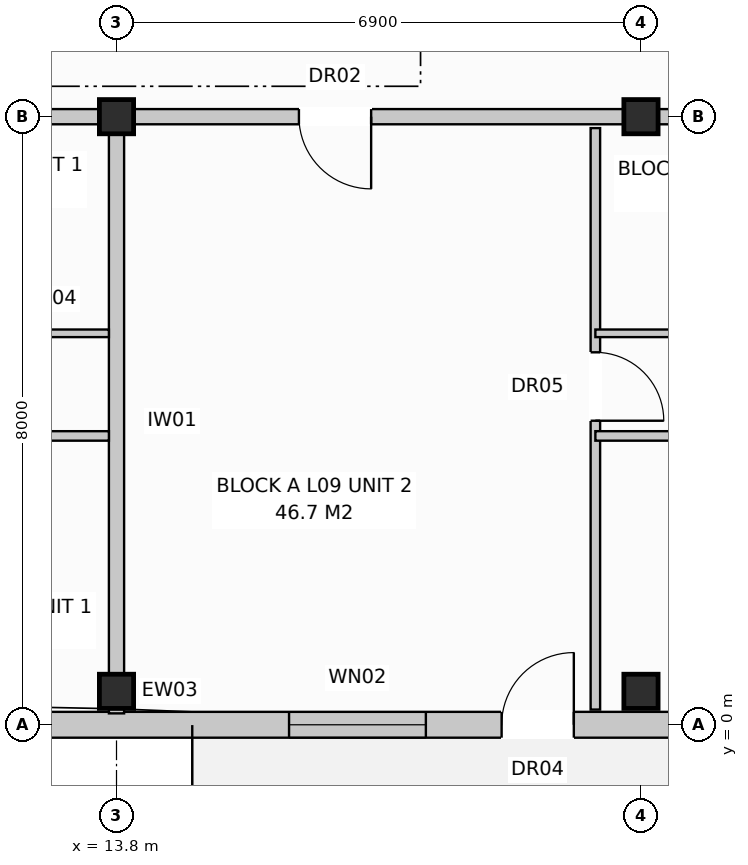
"""IFC4 building model, lengths in metres.
Left out: names, types, materials, properties, quantities, classifications, styles, units other than length and angle.
Written with IfcOpenShell. Run it as: python <this file> out.ifc"""

import sys

from ifc_helpers import new_model, si_unit, direction, frame, frame_2d, origin, origin_with_axes, origin_2d, place, context, subcontext, project, spatial, rectangle, extrude, element, fill, save


model = new_model("IFC4")
c1 = context("Model", 3, precision=1e-05, world=origin(), true_north=direction((0.0, 1.0)))
c2 = subcontext(c1, "Body", "Model", "MODEL_VIEW")
j1 = project(units=[si_unit("LENGTHUNIT", "METRE"), si_unit("PLANEANGLEUNIT", "RADIAN")], contexts=[c1])
p1 = place(None, origin())
s1 = spatial("IfcSite", under=j1, at=p1, CompositionType="ELEMENT")
p2 = place(p1, origin())
s2 = spatial("IfcBuilding", under=s1, at=p2, CompositionType="ELEMENT")
p3 = place(p2, frame((0.0, 0.0, 30.4)))
s3 = spatial("IfcBuildingStorey", under=s2, at=p3, CompositionType="ELEMENT", Elevation=30.4)
for number, where, z_axis, x_axis in (
    (1, (13.8, 0.44, 0.0), (0.0, 0.0, 1.0), (1.0, 0.0, 0.0)),
    (2, (13.8, 8.0, 0.0), (0.0, 0.0, 1.0), (1.0, 0.0, 0.0)),
    (3, (20.7, 0.44, 0.0), (0.0, 0.0, 1.0), (1.0, 0.0, 0.0)),
    (4, (20.7, 8.0, 0.0), (0.0, 0.0, 1.0), (1.0, 0.0, 0.0)),
):
    element("IfcColumn", number, at=place(p3, frame(where, z_axis=z_axis, x_axis=x_axis)), inside=s3, PredefinedType="COLUMN", context=c2, shape_type="SweptSolid", body=[
        extrude(rectangle(XDim=0.45, YDim=0.45, at=origin_2d()), origin(), (0.0, 0.0, 1.0), 3.2),
    ])
p4 = place(p3, frame((0.16, 0.0, 0.0), z_axis=(0.0, 0.0, 1.0), x_axis=(1.0, 0.0, 0.0)))
e5 = element("IfcWall", 5, at=p4, inside=s3, PredefinedType="STANDARD", context=c2, shape_type="SweptSolid", body=[
    extrude(rectangle(XDim=41.08, YDim=0.34, at=frame_2d((20.54, 0.0))), origin(), (0.0, 0.0, 1.0), 2.96),
])
p5 = place(p4, frame((3.807, 0.0, 0.0)))
e6 = element("IfcOpeningElement", 6, at=p5, cuts=e5, PredefinedType="OPENING", context=c2, shape_type="SweptSolid", body=[
    extrude(rectangle(XDim=0.95, YDim=2.1, at=frame_2d((0.475, 1.05))), frame((0.0, 0.182, 0.0), z_axis=(0.0, -1.0, 0.0), x_axis=(1.0, 0.0, 0.0)), (0.0, 0.0, 1.0), 0.364),
])
p6 = place(p4, frame((18.707, 0.0, 0.0)))
e7 = element("IfcOpeningElement", 7, at=p6, cuts=e5, PredefinedType="OPENING", context=c2, shape_type="SweptSolid", body=[
    extrude(rectangle(XDim=0.95, YDim=2.1, at=frame_2d((0.475, 1.05))), frame((0.0, 0.182, 0.0), z_axis=(0.0, -1.0, 0.0), x_axis=(1.0, 0.0, 0.0)), (0.0, 0.0, 1.0), 0.364),
])
p7 = place(p4, frame((29.107, 0.0, 0.0)))
e8 = element("IfcOpeningElement", 8, at=p7, cuts=e5, PredefinedType="OPENING", context=c2, shape_type="SweptSolid", body=[
    extrude(rectangle(XDim=0.95, YDim=2.1, at=frame_2d((0.475, 1.05))), frame((0.0, 0.182, 0.0), z_axis=(0.0, -1.0, 0.0), x_axis=(1.0, 0.0, 0.0)), (0.0, 0.0, 1.0), 0.364),
])
p8 = place(p4, frame((1.61, 0.0, 0.8)))
e9 = element("IfcOpeningElement", 9, at=p8, cuts=e5, PredefinedType="OPENING", context=c2, shape_type="SweptSolid", body=[
    extrude(rectangle(XDim=1.8, YDim=1.7, at=frame_2d((0.9, 0.85))), frame((0.0, 0.182, 0.0), z_axis=(0.0, -1.0, 0.0), x_axis=(1.0, 0.0, 0.0)), (0.0, 0.0, 1.0), 0.364),
])
p9 = place(p4, frame((7.242, 0.0, 0.72)))
e10 = element("IfcOpeningElement", 10, at=p9, cuts=e5, PredefinedType="OPENING", context=c2, shape_type="SweptSolid", body=[
    extrude(rectangle(XDim=1.9, YDim=1.85, at=frame_2d((0.95, 0.925))), frame((0.0, 0.182, 0.0), z_axis=(0.0, -1.0, 0.0), x_axis=(1.0, 0.0, 0.0)), (0.0, 0.0, 1.0), 0.364),
])
p10 = place(p4, frame((10.86, 0.0, 0.72)))
e11 = element("IfcOpeningElement", 11, at=p10, cuts=e5, PredefinedType="OPENING", context=c2, shape_type="SweptSolid", body=[
    extrude(rectangle(XDim=1.1, YDim=1.5, at=frame_2d((0.55, 0.75))), frame((0.0, 0.182, 0.0), z_axis=(0.0, -1.0, 0.0), x_axis=(1.0, 0.0, 0.0)), (0.0, 0.0, 1.0), 0.364),
])
p11 = place(p4, frame((15.91, 0.0, 0.8)))
e12 = element("IfcOpeningElement", 12, at=p11, cuts=e5, PredefinedType="OPENING", context=c2, shape_type="SweptSolid", body=[
    extrude(rectangle(XDim=1.8, YDim=1.7, at=frame_2d((0.9, 0.85))), frame((0.0, 0.182, 0.0), z_axis=(0.0, -1.0, 0.0), x_axis=(1.0, 0.0, 0.0)), (0.0, 0.0, 1.0), 0.364),
])
p12 = place(p4, frame((21.56, 0.0, 0.72)))
e13 = element("IfcOpeningElement", 13, at=p12, cuts=e5, PredefinedType="OPENING", context=c2, shape_type="SweptSolid", body=[
    extrude(rectangle(XDim=1.9, YDim=1.85, at=frame_2d((0.95, 0.925))), frame((0.0, 0.182, 0.0), z_axis=(0.0, -1.0, 0.0), x_axis=(1.0, 0.0, 0.0)), (0.0, 0.0, 1.0), 0.364),
])
p13 = place(p4, frame((25.61, 0.0, 0.72)))
e14 = element("IfcOpeningElement", 14, at=p13, cuts=e5, PredefinedType="OPENING", context=c2, shape_type="SweptSolid", body=[
    extrude(rectangle(XDim=1.1, YDim=1.5, at=frame_2d((0.55, 0.75))), frame((0.0, 0.182, 0.0), z_axis=(0.0, -1.0, 0.0), x_axis=(1.0, 0.0, 0.0)), (0.0, 0.0, 1.0), 0.364),
])
p14 = place(p4, frame((31.41, 0.0, 0.8)))
e15 = element("IfcOpeningElement", 15, at=p14, cuts=e5, PredefinedType="OPENING", context=c2, shape_type="SweptSolid", body=[
    extrude(rectangle(XDim=1.8, YDim=1.7, at=frame_2d((0.9, 0.85))), frame((0.0, 0.182, 0.0), z_axis=(0.0, -1.0, 0.0), x_axis=(1.0, 0.0, 0.0)), (0.0, 0.0, 1.0), 0.364),
])
p15 = place(p4, frame((35.36, 0.0, 0.72)))
e16 = element("IfcOpeningElement", 16, at=p15, cuts=e5, PredefinedType="OPENING", context=c2, shape_type="SweptSolid", body=[
    extrude(rectangle(XDim=1.9, YDim=1.85, at=frame_2d((0.95, 0.925))), frame((0.0, 0.182, 0.0), z_axis=(0.0, -1.0, 0.0), x_axis=(1.0, 0.0, 0.0)), (0.0, 0.0, 1.0), 0.364),
])
p16 = place(p4, frame((39.16, 0.0, 0.72)))
e17 = element("IfcOpeningElement", 17, at=p16, cuts=e5, PredefinedType="OPENING", context=c2, shape_type="SweptSolid", body=[
    extrude(rectangle(XDim=1.1, YDim=1.5, at=frame_2d((0.55, 0.75))), frame((0.0, 0.182, 0.0), z_axis=(0.0, -1.0, 0.0), x_axis=(1.0, 0.0, 0.0)), (0.0, 0.0, 1.0), 0.364),
])
p17 = place(p3, frame((13.8, 7.85, 0.0), z_axis=(0.0, 0.0, 1.0), x_axis=(0.0, -1.0, 0.0)))
e18 = element("IfcWall", 18, at=p17, inside=s3, PredefinedType="PARTITIONING", context=c2, shape_type="SweptSolid", body=[
    extrude(rectangle(XDim=7.7, YDim=0.2, at=frame_2d((3.85, 0.0))), origin(), (0.0, 0.0, 1.0), 2.96),
])
p18 = place(p3, frame((0.0, 8.0, 0.0), z_axis=(0.0, 0.0, 1.0), x_axis=(1.0, 0.0, 0.0)))
e19 = element("IfcWall", 19, at=p18, inside=s3, PredefinedType="PARTITIONING", context=c2, shape_type="SweptSolid", body=[
    extrude(rectangle(XDim=13.8, YDim=0.2, at=frame_2d((6.9, 0.0))), origin(), (0.0, 0.0, 1.0), 2.4),
])
p19 = place(p18, frame((2.4, 0.0, 0.0)))
e20 = element("IfcOpeningElement", 20, at=p19, cuts=e19, PredefinedType="OPENING", context=c2, shape_type="SweptSolid", body=[
    extrude(rectangle(XDim=0.95, YDim=2.15, at=frame_2d((0.475, 1.075))), frame((0.0, 0.112, 0.0), z_axis=(0.0, -1.0, 0.0), x_axis=(1.0, 0.0, 0.0)), (0.0, 0.0, 1.0), 0.224),
])
p20 = place(p3, frame((5.2, 5.15, 0.0), z_axis=(0.0, 0.0, 1.0), x_axis=(1.0, 0.0, 0.0)))
e21 = element("IfcWall", 21, at=p20, inside=s3, PredefinedType="PARTITIONING", context=c2, shape_type="SweptSolid", body=[
    extrude(rectangle(XDim=8.5, YDim=0.1, at=frame_2d((4.25, 0.0))), origin(), (0.0, 0.0, 1.0), 2.96),
])
p21 = place(p20, frame((1.0, 0.0, 0.0)))
e22 = element("IfcOpeningElement", 22, at=p21, cuts=e21, PredefinedType="OPENING", context=c2, shape_type="SweptSolid", body=[
    extrude(rectangle(XDim=0.85, YDim=2.1, at=frame_2d((0.425, 1.05))), frame((0.0, 0.062, 0.0), z_axis=(0.0, -1.0, 0.0), x_axis=(1.0, 0.0, 0.0)), (0.0, 0.0, 1.0), 0.124),
])
p22 = place(p20, frame((3.4, 0.0, 0.0)))
e23 = element("IfcOpeningElement", 23, at=p22, cuts=e21, PredefinedType="OPENING", context=c2, shape_type="SweptSolid", body=[
    extrude(rectangle(XDim=0.85, YDim=2.05, at=frame_2d((0.425, 1.025))), frame((0.0, 0.062, 0.0), z_axis=(0.0, -1.0, 0.0), x_axis=(1.0, 0.0, 0.0)), (0.0, 0.0, 1.0), 0.124),
])
p23 = place(p20, frame((6.2, 0.0, 0.0)))
e24 = element("IfcOpeningElement", 24, at=p23, cuts=e21, PredefinedType="OPENING", context=c2, shape_type="SweptSolid", body=[
    extrude(rectangle(XDim=0.85, YDim=2.05, at=frame_2d((0.425, 1.025))), frame((0.0, 0.062, 0.0), z_axis=(0.0, -1.0, 0.0), x_axis=(1.0, 0.0, 0.0)), (0.0, 0.0, 1.0), 0.124),
])
p24 = place(p3, frame((5.2, 3.8, 0.0), z_axis=(0.0, 0.0, 1.0), x_axis=(1.0, 0.0, 0.0)))
e25 = element("IfcWall", 25, at=p24, inside=s3, PredefinedType="PARTITIONING", context=c2, shape_type="SweptSolid", body=[
    extrude(rectangle(XDim=8.5, YDim=0.125, at=frame_2d((4.25, 0.0))), origin(), (0.0, 0.0, 1.0), 2.96),
])
p25 = place(p24, frame((1.5, 0.0, 0.0)))
e26 = element("IfcOpeningElement", 26, at=p25, cuts=e25, PredefinedType="OPENING", context=c2, shape_type="SweptSolid", body=[
    extrude(rectangle(XDim=0.9, YDim=2.1, at=frame_2d((0.45, 1.05))), frame((0.0, 0.074, 0.0), z_axis=(0.0, -1.0, 0.0), x_axis=(1.0, 0.0, 0.0)), (0.0, 0.0, 1.0), 0.149),
])
p26 = place(p24, frame((5.6, 0.0, 0.0)))
e27 = element("IfcOpeningElement", 27, at=p26, cuts=e25, PredefinedType="OPENING", context=c2, shape_type="SweptSolid", body=[
    extrude(rectangle(XDim=0.9, YDim=2.1, at=frame_2d((0.45, 1.05))), frame((0.0, 0.074, 0.0), z_axis=(0.0, -1.0, 0.0), x_axis=(1.0, 0.0, 0.0)), (0.0, 0.0, 1.0), 0.149),
])
p27 = place(p3, frame((13.8, 8.0, 0.0), z_axis=(0.0, 0.0, 1.0), x_axis=(1.0, 0.0, 0.0)))
e28 = element("IfcWall", 28, at=p27, inside=s3, PredefinedType="PARTITIONING", context=c2, shape_type="SweptSolid", body=[
    extrude(rectangle(XDim=20.7, YDim=0.2, at=frame_2d((10.35, 0.0))), origin(), (0.0, 0.0, 1.0), 2.4),
])
p28 = place(p27, frame((2.4, 0.0, 0.0)))
e29 = element("IfcOpeningElement", 29, at=p28, cuts=e28, PredefinedType="OPENING", context=c2, shape_type="SweptSolid", body=[
    extrude(rectangle(XDim=0.95, YDim=2.15, at=frame_2d((0.475, 1.075))), frame((0.0, 0.112, 0.0), z_axis=(0.0, -1.0, 0.0), x_axis=(1.0, 0.0, 0.0)), (0.0, 0.0, 1.0), 0.224),
])
p29 = place(p3, frame((20.1, 7.85, 0.0), z_axis=(0.0, 0.0, 1.0), x_axis=(0.0, -1.0, 0.0)))
e30 = element("IfcWall", 30, at=p29, inside=s3, PredefinedType="PARTITIONING", context=c2, shape_type="SweptSolid", body=[
    extrude(rectangle(XDim=7.65, YDim=0.125, at=frame_2d((3.825, 0.0))), origin(), (0.0, 0.0, 1.0), 2.96),
])
p30 = place(p29, frame((2.95, 0.0, 0.0)))
e31 = element("IfcOpeningElement", 31, at=p30, cuts=e30, PredefinedType="OPENING", context=c2, shape_type="SweptSolid", body=[
    extrude(rectangle(XDim=0.9, YDim=2.1, at=frame_2d((0.45, 1.05))), frame((0.0, 0.074, 0.0), z_axis=(0.0, -1.0, 0.0), x_axis=(1.0, 0.0, 0.0)), (0.0, 0.0, 1.0), 0.149),
])
p31 = place(p3, frame((20.1, 5.15, 0.0), z_axis=(0.0, 0.0, 1.0), x_axis=(1.0, 0.0, 0.0)))
e32 = element("IfcWall", 32, at=p31, inside=s3, PredefinedType="PARTITIONING", context=c2, shape_type="SweptSolid", body=[
    extrude(rectangle(XDim=14.3, YDim=0.1, at=frame_2d((7.15, 0.0))), origin(), (0.0, 0.0, 1.0), 2.96),
])
p32 = place(p31, frame((1.6, 0.0, 0.0)))
e33 = element("IfcOpeningElement", 33, at=p32, cuts=e32, PredefinedType="OPENING", context=c2, shape_type="SweptSolid", body=[
    extrude(rectangle(XDim=0.9, YDim=2.1, at=frame_2d((0.45, 1.05))), frame((0.0, 0.062, 0.0), z_axis=(0.0, -1.0, 0.0), x_axis=(1.0, 0.0, 0.0)), (0.0, 0.0, 1.0), 0.124),
])
p33 = place(p31, frame((5.1, 0.0, 0.0)))
e34 = element("IfcOpeningElement", 34, at=p33, cuts=e32, PredefinedType="OPENING", context=c2, shape_type="SweptSolid", body=[
    extrude(rectangle(XDim=0.85, YDim=2.05, at=frame_2d((0.425, 1.025))), frame((0.0, 0.062, 0.0), z_axis=(0.0, -1.0, 0.0), x_axis=(1.0, 0.0, 0.0)), (0.0, 0.0, 1.0), 0.124),
])
p34 = place(p31, frame((8.2, 0.0, 0.0)))
e35 = element("IfcOpeningElement", 35, at=p34, cuts=e32, PredefinedType="OPENING", context=c2, shape_type="SweptSolid", body=[
    extrude(rectangle(XDim=0.85, YDim=2.05, at=frame_2d((0.425, 1.025))), frame((0.0, 0.062, 0.0), z_axis=(0.0, -1.0, 0.0), x_axis=(1.0, 0.0, 0.0)), (0.0, 0.0, 1.0), 0.124),
])
p35 = place(p31, frame((11.6, 0.0, 0.0)))
e36 = element("IfcOpeningElement", 36, at=p35, cuts=e32, PredefinedType="OPENING", context=c2, shape_type="SweptSolid", body=[
    extrude(rectangle(XDim=0.85, YDim=2.05, at=frame_2d((0.425, 1.025))), frame((0.0, 0.062, 0.0), z_axis=(0.0, -1.0, 0.0), x_axis=(1.0, 0.0, 0.0)), (0.0, 0.0, 1.0), 0.124),
])
p36 = place(p3, frame((20.1, 3.8, 0.0), z_axis=(0.0, 0.0, 1.0), x_axis=(1.0, 0.0, 0.0)))
e37 = element("IfcWall", 37, at=p36, inside=s3, PredefinedType="PARTITIONING", context=c2, shape_type="SweptSolid", body=[
    extrude(rectangle(XDim=10.4, YDim=0.125, at=frame_2d((5.2, 0.0))), origin(), (0.0, 0.0, 1.0), 2.96),
])
p37 = place(p36, frame((2.0, 0.0, 0.0)))
e38 = element("IfcOpeningElement", 38, at=p37, cuts=e37, PredefinedType="OPENING", context=c2, shape_type="SweptSolid", body=[
    extrude(rectangle(XDim=0.9, YDim=2.1, at=frame_2d((0.45, 1.05))), frame((0.0, 0.074, 0.0), z_axis=(0.0, -1.0, 0.0), x_axis=(1.0, 0.0, 0.0)), (0.0, 0.0, 1.0), 0.149),
])
p38 = place(p36, frame((7.2, 0.0, 0.0)))
e39 = element("IfcOpeningElement", 39, at=p38, cuts=e37, PredefinedType="OPENING", context=c2, shape_type="SweptSolid", body=[
    extrude(rectangle(XDim=0.9, YDim=2.1, at=frame_2d((0.45, 1.05))), frame((0.0, 0.074, 0.0), z_axis=(0.0, -1.0, 0.0), x_axis=(1.0, 0.0, 0.0)), (0.0, 0.0, 1.0), 0.149),
])
p39 = place(p6, origin_with_axes())
e40 = element("IfcDoor", 40, at=p39, inside=s3, OperationType="SINGLE_SWING_RIGHT", PredefinedType="DOOR", context=c2, shape_type="SweptSolid", body=[
    extrude(rectangle(XDim=0.95, YDim=2.1, at=frame_2d((0.475, 1.05))), frame((0.0, 0.025, 0.0), z_axis=(0.0, -1.0, 0.0), x_axis=(1.0, 0.0, 0.0)), (0.0, 0.0, 1.0), 0.05),
])
fill(e7, e40)
p40 = place(p11, origin_with_axes())
e41 = element("IfcWindow", 41, at=p40, inside=s3, PartitioningType="SINGLE_PANEL", PredefinedType="WINDOW", context=c2, shape_type="SweptSolid", body=[
    extrude(rectangle(XDim=1.8, YDim=1.7, at=frame_2d((0.9, 0.85))), frame((0.0, 0.03, 0.0), z_axis=(0.0, -1.0, 0.0), x_axis=(1.0, 0.0, 0.0)), (0.0, 0.0, 1.0), 0.06),
])
fill(e12, e41)
p41 = place(p28, frame((0.95, 0.0, 0.0), z_axis=(0.0, 0.0, 1.0), x_axis=(-1.0, 0.0, 0.0)))
e42 = element("IfcDoor", 42, at=p41, inside=s3, OperationType="SINGLE_SWING_RIGHT", PredefinedType="DOOR", context=c2, shape_type="SweptSolid", body=[
    extrude(rectangle(XDim=0.95, YDim=2.15, at=frame_2d((0.475, 1.075))), frame((0.0, 0.025, 0.0), z_axis=(0.0, -1.0, 0.0), x_axis=(1.0, 0.0, 0.0)), (0.0, 0.0, 1.0), 0.05),
])
fill(e29, e42)
p42 = place(p30, origin_with_axes())
e43 = element("IfcDoor", 43, at=p42, inside=s3, OperationType="SINGLE_SWING_RIGHT", PredefinedType="DOOR", context=c2, shape_type="SweptSolid", body=[
    extrude(rectangle(XDim=0.9, YDim=2.1, at=frame_2d((0.45, 1.05))), frame((0.0, 0.025, 0.0), z_axis=(0.0, -1.0, 0.0), x_axis=(1.0, 0.0, 0.0)), (0.0, 0.0, 1.0), 0.05),
])
fill(e31, e43)
save(model, sys.argv[1])
